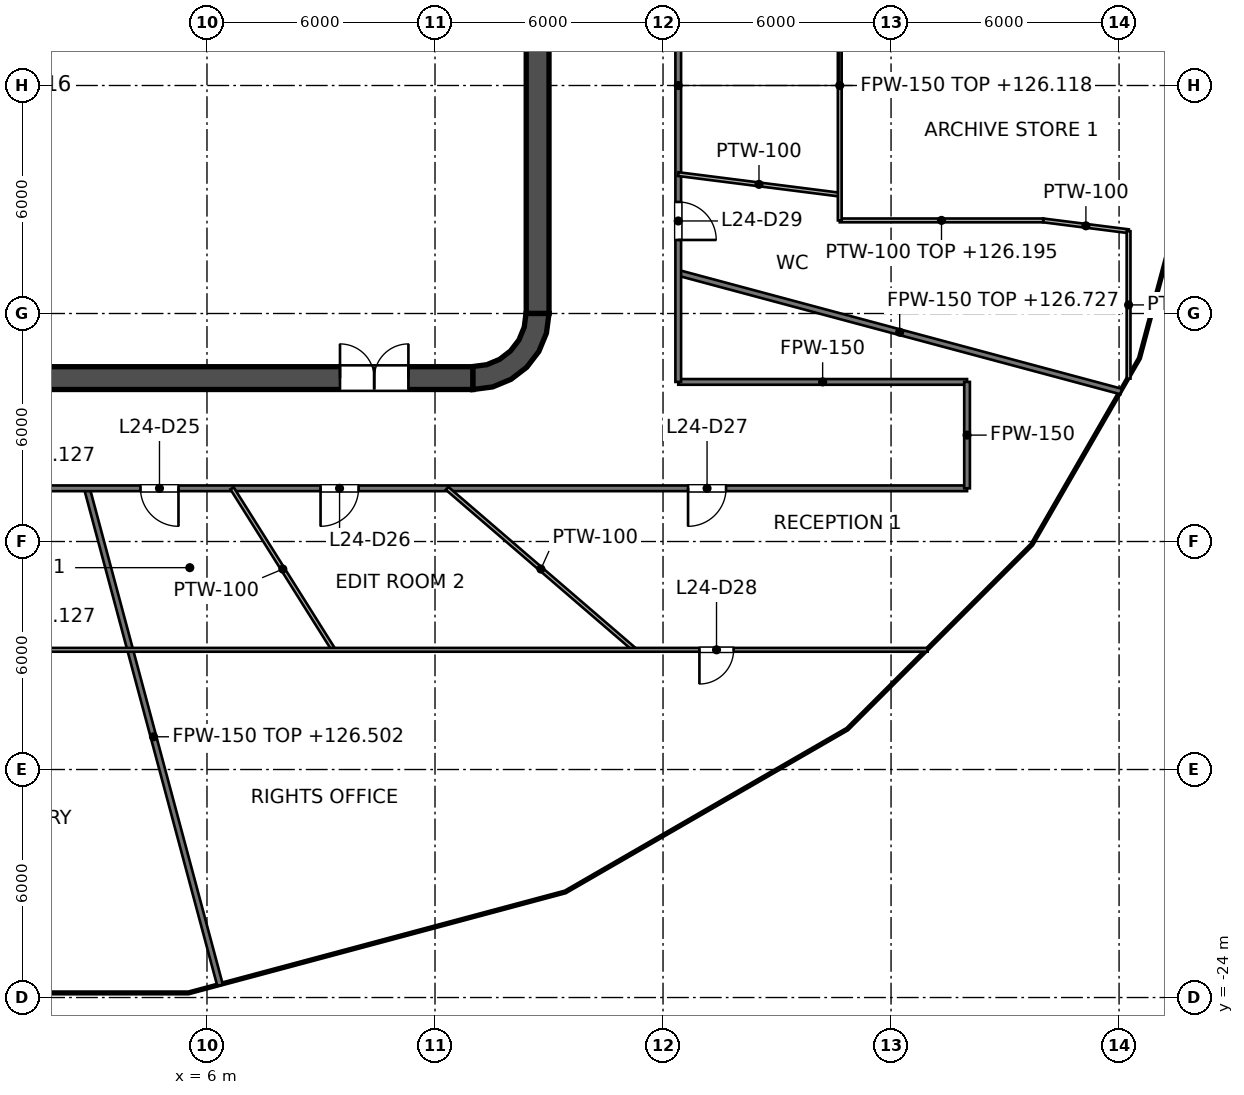
"""IFC4 building model, lengths in metres.
Left out: names, types, materials, properties, quantities, classifications, styles, units other than length and angle.
Written with IfcOpenShell. Run it as: python <this file> out.ifc"""

import sys

from ifc_helpers import new_model, si_unit, direction, frame, frame_2d, origin, place, context, subcontext, project, spatial, polyline, rectangle, outline, extrude, element, fill, save


model = new_model("IFC4")
c1 = context("Model", 3, precision=1e-05, world=origin(), true_north=direction((0.0, 1.0)))
c2 = subcontext(c1, "Body", "Model", "MODEL_VIEW")
j1 = project(units=[si_unit("LENGTHUNIT", "METRE"), si_unit("PLANEANGLEUNIT", "RADIAN")], contexts=[c1])
p1 = place(None, origin())
s1 = spatial("IfcSite", under=j1, at=p1, CompositionType="ELEMENT")
p2 = place(p1, origin())
s2 = spatial("IfcBuilding", under=s1, at=p2, CompositionType="ELEMENT")
p3 = place(p2, frame((0.0, 0.0, 123.0)))
s3 = spatial("IfcBuildingStorey", under=s2, at=p3, CompositionType="ELEMENT", Elevation=123.0)
p4 = place(p3, frame((-13.0, -7.7, 0.0), z_axis=(0.0, 0.0, 1.0), x_axis=(1.0, 0.0, 0.0)))
e1 = element("IfcWall", 1, at=p4, inside=s3, PredefinedType="SHEAR", context=c2, shape_type="SweptSolid", body=[
    extrude(rectangle(XDim=26.0, YDim=0.6, at=frame_2d((13.0, 0.0))), origin(), (0.0, 0.0, 1.0), 4.2),
])
p5 = place(p4, frame((1.7, 0.0, 0.0)))
e2 = element("IfcOpeningElement", 2, at=p5, cuts=e1, PredefinedType="OPENING", context=c2, shape_type="SweptSolid", body=[
    extrude(rectangle(XDim=1.8, YDim=2.1, at=frame_2d((0.9, 1.05))), frame((0.0, 0.3, 0.0), z_axis=(0.0, -1.0, 0.0), x_axis=(1.0, 0.0, 0.0)), (0.0, 0.0, 1.0), 0.6),
])
p6 = place(p4, frame((22.5, 0.0, 0.0)))
e3 = element("IfcOpeningElement", 3, at=p6, cuts=e1, PredefinedType="OPENING", context=c2, shape_type="SweptSolid", body=[
    extrude(rectangle(XDim=1.8, YDim=2.1, at=frame_2d((0.9, 1.05))), frame((0.0, 0.3, 0.0), z_axis=(0.0, -1.0, 0.0), x_axis=(1.0, 0.0, 0.0)), (0.0, 0.0, 1.0), 0.6),
])
p7 = place(p3, frame((14.7, -6.0, 0.0), z_axis=(0.0, 0.0, 1.0), x_axis=(0.0, 1.0, 0.0)))
e4 = element("IfcWall", 4, at=p7, inside=s3, PredefinedType="SHEAR", context=c2, shape_type="SweptSolid", body=[
    extrude(rectangle(XDim=12.0, YDim=0.6, at=frame_2d((6.0, 0.0))), origin(), (0.0, 0.0, 1.0), 4.2),
])
p8 = place(p3, origin())
e5 = element("IfcWall", 5, at=p8, inside=s3, PredefinedType="SHEAR", context=c2, shape_type="SweptSolid", body=[
    extrude(outline(polyline([(15.0, -6.0), (14.395, -6.0), (14.347, -6.361), (14.208, -6.698), (13.986, -6.986), (13.698, -7.208), (13.361, -7.347), (13.0, -7.395), (13.0, -8.0), (13.518, -7.932), (14.0, -7.732), (14.414, -7.414), (14.732, -7.0), (14.932, -6.518), (15.0, -6.0)])), origin(), (0.0, 0.0, 1.0), 4.2),
])
p9 = place(p3, frame((9.0, -6.6, 0.0), z_axis=(0.0, 0.0, 1.0), x_axis=(0.0, 1.0, 0.0)))
e6 = element("IfcWall", 6, at=p9, inside=s3, PredefinedType="SOLIDWALL", context=c2, shape_type="SweptSolid", body=[
    extrude(rectangle(XDim=2.5, YDim=0.25, at=frame_2d((1.25, 0.0))), origin(), (0.0, 0.0, 1.0), 4.05),
])
p10 = place(p9, frame((0.65, 0.0, 0.0)))
e7 = element("IfcOpeningElement", 7, at=p10, cuts=e6, PredefinedType="OPENING", context=c2, shape_type="SweptSolid", body=[
    extrude(rectangle(XDim=1.2, YDim=2.1, at=frame_2d((0.6, 1.05))), frame((0.0, 0.125, 0.0), z_axis=(0.0, -1.0, 0.0), x_axis=(1.0, 0.0, 0.0)), (0.0, 0.0, 1.0), 0.25),
])
p11 = place(p3, frame((3.15, -6.6, 0.0), z_axis=(0.0, 0.0, 1.0), x_axis=(0.0, 1.0, 0.0)))
e8 = element("IfcWall", 8, at=p11, inside=s3, PredefinedType="SOLIDWALL", context=c2, shape_type="SweptSolid", body=[
    extrude(rectangle(XDim=2.5, YDim=0.25, at=frame_2d((1.25, 0.0))), origin(), (0.0, 0.0, 1.0), 4.05),
])
p12 = place(p3, frame((-9.125, -7.0, 0.0), z_axis=(0.0, 0.0, 1.0), x_axis=(1.0, 0.0, 0.0)))
e9 = element("IfcWall", 9, at=p12, inside=s3, PredefinedType="SOLIDWALL", context=c2, shape_type="SweptSolid", body=[
    extrude(rectangle(XDim=18.25, YDim=0.8, at=frame_2d((9.125, 0.0))), origin(), (0.0, 0.0, 1.0), 4.05),
])
p13 = place(p3, frame((-9.125, -1.525, 0.0), z_axis=(0.0, 0.0, 1.0), x_axis=(1.0, 0.0, 0.0)))
e10 = element("IfcWall", 10, at=p13, inside=s3, PredefinedType="SOLIDWALL", context=c2, shape_type="SweptSolid", body=[
    extrude(rectangle(XDim=18.25, YDim=0.25, at=frame_2d((9.125, 0.0))), origin(), (0.0, 0.0, 1.0), 4.05),
])
p14 = place(p13, frame((7.15, 0.0, 0.0)))
e11 = element("IfcOpeningElement", 11, at=p14, cuts=e10, PredefinedType="OPENING", context=c2, shape_type="SweptSolid", body=[
    extrude(rectangle(XDim=1.2, YDim=2.1, at=frame_2d((0.6, 1.05))), frame((0.0, 0.125, 0.0), z_axis=(0.0, -1.0, 0.0), x_axis=(1.0, 0.0, 0.0)), (0.0, 0.0, 1.0), 0.25),
])
p15 = place(p13, frame((10.2, 0.0, 0.0)))
e12 = element("IfcOpeningElement", 12, at=p15, cuts=e10, PredefinedType="OPENING", context=c2, shape_type="SweptSolid", body=[
    extrude(rectangle(XDim=1.2, YDim=2.1, at=frame_2d((0.6, 1.05))), frame((0.0, 0.125, 0.0), z_axis=(0.0, -1.0, 0.0), x_axis=(1.0, 0.0, 0.0)), (0.0, 0.0, 1.0), 0.25),
])
p16 = place(p13, frame((16.075, 0.0, 0.0)))
e13 = element("IfcOpeningElement", 13, at=p16, cuts=e10, PredefinedType="OPENING", context=c2, shape_type="SweptSolid", body=[
    extrude(rectangle(XDim=1.0, YDim=2.1, at=frame_2d((0.5, 1.05))), frame((0.0, 0.125, 0.0), z_axis=(0.0, -1.0, 0.0), x_axis=(1.0, 0.0, 0.0)), (0.0, 0.0, 1.0), 0.25),
])
p17 = place(p3, frame((-9.125, -3.975, 0.0), z_axis=(0.0, 0.0, 1.0), x_axis=(1.0, 0.0, 0.0)))
e14 = element("IfcWall", 14, at=p17, inside=s3, PredefinedType="SOLIDWALL", context=c2, shape_type="SweptSolid", body=[
    extrude(rectangle(XDim=12.4, YDim=0.25, at=frame_2d((6.2, 0.0))), origin(), (0.0, 0.0, 1.0), 4.05),
])
p18 = place(p17, frame((1.05, 0.0, 0.0)))
e15 = element("IfcOpeningElement", 15, at=p18, cuts=e14, PredefinedType="OPENING", context=c2, shape_type="SweptSolid", body=[
    extrude(rectangle(XDim=1.2, YDim=2.1, at=frame_2d((0.6, 1.05))), frame((0.0, 0.125, 0.0), z_axis=(0.0, -1.0, 0.0), x_axis=(1.0, 0.0, 0.0)), (0.0, 0.0, 1.0), 0.25),
])
p19 = place(p17, frame((4.1, 0.0, 0.0)))
e16 = element("IfcOpeningElement", 16, at=p19, cuts=e14, PredefinedType="OPENING", context=c2, shape_type="SweptSolid", body=[
    extrude(rectangle(XDim=1.2, YDim=2.1, at=frame_2d((0.6, 1.05))), frame((0.0, 0.125, 0.0), z_axis=(0.0, -1.0, 0.0), x_axis=(1.0, 0.0, 0.0)), (0.0, 0.0, 1.0), 0.25),
])
p20 = place(p3, frame((3.275, -3.975, 0.0), z_axis=(0.0, 0.0, 1.0), x_axis=(1.0, 0.0, 0.0)))
e17 = element("IfcWall", 17, at=p20, inside=s3, PredefinedType="SOLIDWALL", context=c2, shape_type="SweptSolid", body=[
    extrude(rectangle(XDim=5.85, YDim=0.25, at=frame_2d((2.925, 0.0))), origin(), (0.0, 0.0, 1.0), 4.05),
])
for number, where, z_axis, x_axis in (
    (18, (3.2, -3.85, 0.0), (0.0, 0.0, 1.0), (0.0, 1.0, 0.0)),
    (19, (5.9, -3.85, 0.0), (0.0, 0.0, 1.0), (0.0, 1.0, 0.0)),
    (20, (9.0, -3.85, 0.0), (0.0, 0.0, 1.0), (0.0, 1.0, 0.0)),
):
    element("IfcWall", number, at=place(p3, frame(where, z_axis=z_axis, x_axis=x_axis)), inside=s3, PredefinedType="SOLIDWALL", context=c2, shape_type="SweptSolid", body=[
        extrude(rectangle(XDim=2.2, YDim=0.25, at=frame_2d((1.1, 0.0))), origin(), (0.0, 0.0, 1.0), 4.05),
    ])
p21 = place(p3, frame((11.8, -7.4, 0.0), z_axis=(0.0, 0.0, 1.0), x_axis=(0.0, 1.0, 0.0)))
e21 = element("IfcWall", 21, at=p21, inside=s3, PredefinedType="SOLIDWALL", context=c2, shape_type="SweptSolid", body=[
    extrude(rectangle(XDim=14.8, YDim=0.4, at=frame_2d((7.4, 0.0))), origin(), (0.0, 0.0, 1.0), 4.05),
])
p22 = place(p21, frame((11.2, 0.0, 0.0)))
e22 = element("IfcOpeningElement", 22, at=p22, cuts=e21, PredefinedType="OPENING", context=c2, shape_type="SweptSolid", body=[
    extrude(rectangle(XDim=1.1, YDim=2.1, at=frame_2d((0.55, 1.05))), frame((0.0, 0.2, 0.0), z_axis=(0.0, -1.0, 0.0), x_axis=(1.0, 0.0, 0.0)), (0.0, 0.0, 1.0), 0.4),
])
p23 = place(p21, frame((8.3, 0.0, 0.0)))
e23 = element("IfcOpeningElement", 23, at=p23, cuts=e21, PredefinedType="OPENING", context=c2, shape_type="SweptSolid", body=[
    extrude(rectangle(XDim=1.1, YDim=2.1, at=frame_2d((0.55, 1.05))), frame((0.0, 0.2, 0.0), z_axis=(0.0, -1.0, 0.0), x_axis=(1.0, 0.0, 0.0)), (0.0, 0.0, 1.0), 0.4),
])
p24 = place(p21, frame((5.4, 0.0, 0.0)))
e24 = element("IfcOpeningElement", 24, at=p24, cuts=e21, PredefinedType="OPENING", context=c2, shape_type="SweptSolid", body=[
    extrude(rectangle(XDim=1.1, YDim=2.1, at=frame_2d((0.55, 1.05))), frame((0.0, 0.2, 0.0), z_axis=(0.0, -1.0, 0.0), x_axis=(1.0, 0.0, 0.0)), (0.0, 0.0, 1.0), 0.4),
])
p25 = place(p21, frame((13.552, 0.0, 0.0)))
e25 = element("IfcOpeningElement", 25, at=p25, cuts=e21, PredefinedType="OPENING", context=c2, shape_type="SweptSolid", body=[
    extrude(rectangle(XDim=0.9, YDim=2.1, at=frame_2d((0.45, 1.05))), frame((0.0, 0.2, 0.0), z_axis=(0.0, -1.0, 0.0), x_axis=(1.0, 0.0, 0.0)), (0.0, 0.0, 1.0), 0.4),
])
p26 = place(p21, frame((0.347, 0.0, 0.0)))
e26 = element("IfcOpeningElement", 26, at=p26, cuts=e21, PredefinedType="OPENING", context=c2, shape_type="SweptSolid", body=[
    extrude(rectangle(XDim=0.9, YDim=2.1, at=frame_2d((0.45, 1.05))), frame((0.0, 0.2, 0.0), z_axis=(0.0, -1.0, 0.0), x_axis=(1.0, 0.0, 0.0)), (0.0, 0.0, 1.0), 0.4),
])
e27 = element("IfcWall", 27, at=p8, inside=s3, PredefinedType="SOLIDWALL", context=c2, shape_type="SweptSolid", body=[
    extrude(outline(polyline([(12.0, -5.675), (12.0, -5.925), (14.15, -5.925), (14.4, -5.925), (14.4, -5.675), (14.4, -3.025), (14.4, -2.775), (14.4, -0.125), (14.4, 0.125), (14.4, 2.775), (14.4, 3.025), (14.4, 5.675), (14.4, 5.925), (14.15, 5.925), (12.0, 5.925), (12.0, 5.675), (14.15, 5.675), (14.15, 3.025), (12.0, 3.025), (12.0, 2.775), (14.15, 2.775), (14.15, 0.125), (12.0, 0.125), (12.0, -0.125), (14.15, -0.125), (14.15, -2.775), (12.0, -2.775), (12.0, -3.025), (14.15, -3.025), (14.15, -5.675), (12.0, -5.675)])), origin(), (0.0, 0.0, 1.0), 4.05),
])
p27 = place(p3, frame((2.84, -10.6, 0.0), z_axis=(0.0, 0.0, 1.0), x_axis=(0.258833134742, -0.965922050872, 0.0)))
e28 = element("IfcWall", 28, at=p27, inside=s3, PredefinedType="PARTITIONING", context=c2, shape_type="SweptSolid", body=[
    extrude(rectangle(XDim=13.538, YDim=0.15, at=frame_2d((6.769, 0.0))), origin(), (0.0, 0.0, 1.0), 3.502),
])
p28 = place(p3, frame((18.4, -4.93, 0.0), z_axis=(0.0, 0.0, 1.0), x_axis=(0.96591851449, -0.258846331567, 0.0)))
e29 = element("IfcWall", 29, at=p28, inside=s3, PredefinedType="PARTITIONING", context=c2, shape_type="SweptSolid", body=[
    extrude(rectangle(XDim=12.065, YDim=0.15, at=frame_2d((6.033, 0.0))), origin(), (0.0, 0.0, 1.0), 3.727),
])
p29 = place(p3, frame((-26.0, -10.6, 0.0), z_axis=(0.0, 0.0, 1.0), x_axis=(1.0, 0.0, 0.0)))
e30 = element("IfcWall", 30, at=p29, inside=s3, PredefinedType="PARTITIONING", context=c2, shape_type="SweptSolid", body=[
    extrude(rectangle(XDim=52.0, YDim=0.15, at=frame_2d((26.0, 0.0))), origin(), (0.0, 0.0, 1.0), 3.127),
])
p30 = place(p29, frame((17.62, 0.0, 0.0)))
e31 = element("IfcOpeningElement", 31, at=p30, cuts=e30, PredefinedType="OPENING", context=c2, shape_type="SweptSolid", body=[
    extrude(rectangle(XDim=1.2, YDim=2.1, at=frame_2d((0.6, 1.05))), frame((0.0, 0.075, 0.0), z_axis=(0.0, -1.0, 0.0), x_axis=(1.0, 0.0, 0.0)), (0.0, 0.0, 1.0), 0.15),
])
p31 = place(p29, frame((30.25, 0.0, 0.0)))
e32 = element("IfcOpeningElement", 32, at=p31, cuts=e30, PredefinedType="OPENING", context=c2, shape_type="SweptSolid", body=[
    extrude(rectangle(XDim=1.0, YDim=2.1, at=frame_2d((0.5, 1.05))), frame((0.0, 0.075, 0.0), z_axis=(0.0, -1.0, 0.0), x_axis=(1.0, 0.0, 0.0)), (0.0, 0.0, 1.0), 0.15),
])
p32 = place(p29, frame((34.989, 0.0, 0.0)))
e33 = element("IfcOpeningElement", 33, at=p32, cuts=e30, PredefinedType="OPENING", context=c2, shape_type="SweptSolid", body=[
    extrude(rectangle(XDim=1.0, YDim=2.1, at=frame_2d((0.5, 1.05))), frame((0.0, 0.075, 0.0), z_axis=(0.0, -1.0, 0.0), x_axis=(1.0, 0.0, 0.0)), (0.0, 0.0, 1.0), 0.15),
])
p33 = place(p29, frame((44.658, 0.0, 0.0)))
e34 = element("IfcOpeningElement", 34, at=p33, cuts=e30, PredefinedType="OPENING", context=c2, shape_type="SweptSolid", body=[
    extrude(rectangle(XDim=1.0, YDim=2.1, at=frame_2d((0.5, 1.05))), frame((0.0, 0.075, 0.0), z_axis=(0.0, -1.0, 0.0), x_axis=(1.0, 0.0, 0.0)), (0.0, 0.0, 1.0), 0.15),
])
p34 = place(p3, frame((18.4, -7.8, 0.0), z_axis=(0.0, 0.0, 1.0), x_axis=(1.0, 0.0, 0.0)))
e35 = element("IfcWall", 35, at=p34, inside=s3, PredefinedType="PARTITIONING", context=c2, shape_type="SweptSolid", body=[
    extrude(rectangle(XDim=7.6, YDim=0.15, at=frame_2d((3.8, 0.0))), origin(), (0.0, 0.0, 1.0), 3.276),
])
p35 = place(p3, frame((26.0, -10.6, 0.0), z_axis=(0.0, 0.0, 1.0), x_axis=(0.0, 1.0, 0.0)))
e36 = element("IfcWall", 36, at=p35, inside=s3, PredefinedType="PARTITIONING", context=c2, shape_type="SweptSolid", body=[
    extrude(rectangle(XDim=2.8, YDim=0.15, at=frame_2d((1.4, 0.0))), origin(), (0.0, 0.0, 1.0), 3.276),
])
p36 = place(p3, frame((18.4, -7.8, 0.0), z_axis=(0.0, 0.0, 1.0), x_axis=(0.0, 1.0, 0.0)))
e37 = element("IfcWall", 37, at=p36, inside=s3, PredefinedType="PARTITIONING", context=c2, shape_type="SweptSolid", body=[
    extrude(rectangle(XDim=15.6, YDim=0.15, at=frame_2d((7.8, 0.0))), origin(), (0.0, 0.0, 1.0), 3.118),
])
p37 = place(p36, frame((3.735, 0.0, 0.0)))
e38 = element("IfcOpeningElement", 38, at=p37, cuts=e37, PredefinedType="OPENING", context=c2, shape_type="SweptSolid", body=[
    extrude(rectangle(XDim=1.0, YDim=2.1, at=frame_2d((0.5, 1.05))), frame((0.0, 0.075, 0.0), z_axis=(0.0, -1.0, 0.0), x_axis=(1.0, 0.0, 0.0)), (0.0, 0.0, 1.0), 0.15),
])
p38 = place(p3, frame((6.66, -10.6, 0.0), z_axis=(0.0, 0.0, 1.0), x_axis=(0.532130705972, -0.846662218221, 0.0)))
e39 = element("IfcWall", 39, at=p38, inside=s3, PredefinedType="PARTITIONING", context=c2, shape_type="SweptSolid", body=[
    extrude(rectangle(XDim=5.02, YDim=0.1, at=frame_2d((2.51, 0.0))), origin(), (0.0, 0.0, 1.0), 4.05),
])
p39 = place(p3, frame((12.317, -10.6, 0.0), z_axis=(0.0, 0.0, 1.0), x_axis=(0.758012166178, -0.652240412675, 0.0)))
e40 = element("IfcWall", 40, at=p39, inside=s3, PredefinedType="PARTITIONING", context=c2, shape_type="SweptSolid", body=[
    extrude(rectangle(XDim=6.516, YDim=0.1, at=frame_2d((3.258, 0.0))), origin(), (0.0, 0.0, 1.0), 4.05),
])
p40 = place(p3, frame((18.4, -2.332, 0.0), z_axis=(0.0, 0.0, 1.0), x_axis=(0.992044690644, -0.125886185756, 0.0)))
e41 = element("IfcWall", 41, at=p40, inside=s3, PredefinedType="PARTITIONING", context=c2, shape_type="SweptSolid", body=[
    extrude(rectangle(XDim=4.284, YDim=0.1, at=frame_2d((2.142, 0.0))), origin(), (0.0, 0.0, 1.0), 4.05),
])
p41 = place(p3, frame((28.005, -3.55, 0.0), z_axis=(0.0, 0.0, 1.0), x_axis=(0.992043783592, -0.125893333564, 0.0)))
e42 = element("IfcWall", 42, at=p41, inside=s3, PredefinedType="PARTITIONING", context=c2, shape_type="SweptSolid", body=[
    extrude(rectangle(XDim=2.263, YDim=0.1, at=frame_2d((1.132, 0.0))), origin(), (0.0, 0.0, 1.0), 4.05),
])
p42 = place(p3, frame((-24.963, -14.85, 0.0), z_axis=(0.0, 0.0, 1.0), x_axis=(1.0, 0.0, 0.0)))
e43 = element("IfcWall", 43, at=p42, inside=s3, PredefinedType="PARTITIONING", context=c2, shape_type="SweptSolid", body=[
    extrude(rectangle(XDim=49.926, YDim=0.1, at=frame_2d((24.963, 0.0))), origin(), (0.0, 0.0, 1.0), 3.127),
])
p43 = place(p42, frame((13.521, 0.0, 0.0)))
e44 = element("IfcOpeningElement", 44, at=p43, cuts=e43, PredefinedType="OPENING", context=c2, shape_type="SweptSolid", body=[
    extrude(rectangle(XDim=1.8, YDim=2.1, at=frame_2d((0.9, 1.05))), frame((0.0, 0.05, 0.0), z_axis=(0.0, -1.0, 0.0), x_axis=(1.0, 0.0, 0.0)), (0.0, 0.0, 1.0), 0.1),
])
p44 = place(p42, frame((43.92, 0.0, 0.0)))
e45 = element("IfcOpeningElement", 45, at=p44, cuts=e43, PredefinedType="OPENING", context=c2, shape_type="SweptSolid", body=[
    extrude(rectangle(XDim=0.9, YDim=2.1, at=frame_2d((0.45, 1.05))), frame((0.0, 0.05, 0.0), z_axis=(0.0, -1.0, 0.0), x_axis=(1.0, 0.0, 0.0)), (0.0, 0.0, 1.0), 0.1),
])
p45 = place(p3, frame((22.65, -3.55, 0.0), z_axis=(0.0, 0.0, 1.0), x_axis=(1.0, 0.0, 0.0)))
e46 = element("IfcWall", 46, at=p45, inside=s3, PredefinedType="PARTITIONING", context=c2, shape_type="SweptSolid", body=[
    extrude(rectangle(XDim=5.355, YDim=0.1, at=frame_2d((2.677, 0.0))), origin(), (0.0, 0.0, 1.0), 3.195),
])
p46 = place(p3, frame((30.25, -7.713, 0.0), z_axis=(0.0, 0.0, 1.0), x_axis=(0.0, 1.0, 0.0)))
e47 = element("IfcWall", 47, at=p46, inside=s3, PredefinedType="PARTITIONING", context=c2, shape_type="SweptSolid", body=[
    extrude(rectangle(XDim=3.878, YDim=0.1, at=frame_2d((1.939, 0.0))), origin(), (0.0, 0.0, 1.0), 3.127),
])
p47 = place(p3, frame((22.65, -3.55, 0.0), z_axis=(0.0, 0.0, 1.0), x_axis=(0.0, 1.0, 0.0)))
e48 = element("IfcWall", 48, at=p47, inside=s3, PredefinedType="PARTITIONING", context=c2, shape_type="SweptSolid", body=[
    extrude(rectangle(XDim=7.1, YDim=0.1, at=frame_2d((3.55, 0.0))), origin(), (0.0, 0.0, 1.0), 3.118),
])
p48 = place(p24, origin())
e49 = element("IfcDoor", 49, at=p48, inside=s3, OperationType="DOUBLE_DOOR_SLIDING", PredefinedType="DOOR", context=c2, shape_type="SweptSolid", body=[
    extrude(rectangle(XDim=1.1, YDim=2.1, at=frame_2d((0.55, 1.05))), frame((0.0, 0.025, 0.0), z_axis=(0.0, -1.0, 0.0), x_axis=(1.0, 0.0, 0.0)), (0.0, 0.0, 1.0), 0.05),
])
fill(e24, e49)
p49 = place(p15, origin())
e50 = element("IfcDoor", 50, at=p49, inside=s3, OperationType="DOUBLE_DOOR_SLIDING", PredefinedType="DOOR", context=c2, shape_type="SweptSolid", body=[
    extrude(rectangle(XDim=1.2, YDim=2.1, at=frame_2d((0.6, 1.05))), frame((0.0, 0.025, 0.0), z_axis=(0.0, -1.0, 0.0), x_axis=(1.0, 0.0, 0.0)), (0.0, 0.0, 1.0), 0.05),
])
fill(e12, e50)
p50 = place(p10, origin())
e51 = element("IfcDoor", 51, at=p50, inside=s3, OperationType="SINGLE_SWING_LEFT", PredefinedType="DOOR", context=c2, shape_type="SweptSolid", body=[
    extrude(rectangle(XDim=1.2, YDim=2.1, at=frame_2d((0.6, 1.05))), frame((0.0, 0.025, 0.0), z_axis=(0.0, -1.0, 0.0), x_axis=(1.0, 0.0, 0.0)), (0.0, 0.0, 1.0), 0.05),
])
fill(e7, e51)
p51 = place(p16, origin())
e52 = element("IfcDoor", 52, at=p51, inside=s3, OperationType="SINGLE_SWING_RIGHT", PredefinedType="DOOR", context=c2, shape_type="SweptSolid", body=[
    extrude(rectangle(XDim=1.0, YDim=2.1, at=frame_2d((0.5, 1.05))), frame((0.0, 0.025, 0.0), z_axis=(0.0, -1.0, 0.0), x_axis=(1.0, 0.0, 0.0)), (0.0, 0.0, 1.0), 0.05),
])
fill(e13, e52)
p52 = place(p26, origin())
e53 = element("IfcDoor", 53, at=p52, inside=s3, OperationType="SINGLE_SWING_RIGHT", PredefinedType="DOOR", context=c2, shape_type="SweptSolid", body=[
    extrude(rectangle(XDim=0.9, YDim=2.1, at=frame_2d((0.45, 1.05))), frame((0.0, 0.025, 0.0), z_axis=(0.0, -1.0, 0.0), x_axis=(1.0, 0.0, 0.0)), (0.0, 0.0, 1.0), 0.05),
])
fill(e26, e53)
p53 = place(p6, origin())
e54 = element("IfcDoor", 54, at=p53, inside=s3, OperationType="DOUBLE_DOOR_SINGLE_SWING", PredefinedType="DOOR", context=c2, shape_type="SweptSolid", body=[
    extrude(rectangle(XDim=1.8, YDim=2.1, at=frame_2d((0.9, 1.05))), frame((0.0, 0.025, 0.0), z_axis=(0.0, -1.0, 0.0), x_axis=(1.0, 0.0, 0.0)), (0.0, 0.0, 1.0), 0.05),
])
fill(e3, e54)
p54 = place(p31, origin())
e55 = element("IfcDoor", 55, at=p54, inside=s3, OperationType="SINGLE_SWING_RIGHT", PredefinedType="DOOR", context=c2, shape_type="SweptSolid", body=[
    extrude(rectangle(XDim=1.0, YDim=2.1, at=frame_2d((0.5, 1.05))), frame((0.0, 0.025, 0.0), z_axis=(0.0, -1.0, 0.0), x_axis=(1.0, 0.0, 0.0)), (0.0, 0.0, 1.0), 0.05),
])
fill(e32, e55)
p55 = place(p32, origin())
e56 = element("IfcDoor", 56, at=p55, inside=s3, OperationType="SINGLE_SWING_LEFT", PredefinedType="DOOR", context=c2, shape_type="SweptSolid", body=[
    extrude(rectangle(XDim=1.0, YDim=2.1, at=frame_2d((0.5, 1.05))), frame((0.0, 0.025, 0.0), z_axis=(0.0, -1.0, 0.0), x_axis=(1.0, 0.0, 0.0)), (0.0, 0.0, 1.0), 0.05),
])
fill(e33, e56)
p56 = place(p33, origin())
e57 = element("IfcDoor", 57, at=p56, inside=s3, OperationType="SINGLE_SWING_LEFT", PredefinedType="DOOR", context=c2, shape_type="SweptSolid", body=[
    extrude(rectangle(XDim=1.0, YDim=2.1, at=frame_2d((0.5, 1.05))), frame((0.0, 0.025, 0.0), z_axis=(0.0, -1.0, 0.0), x_axis=(1.0, 0.0, 0.0)), (0.0, 0.0, 1.0), 0.05),
])
fill(e34, e57)
p57 = place(p44, origin())
e58 = element("IfcDoor", 58, at=p57, inside=s3, OperationType="SINGLE_SWING_LEFT", PredefinedType="DOOR", context=c2, shape_type="SweptSolid", body=[
    extrude(rectangle(XDim=0.9, YDim=2.1, at=frame_2d((0.45, 1.05))), frame((0.0, 0.025, 0.0), z_axis=(0.0, -1.0, 0.0), x_axis=(1.0, 0.0, 0.0)), (0.0, 0.0, 1.0), 0.05),
])
fill(e45, e58)
p58 = place(p37, origin())
e59 = element("IfcDoor", 59, at=p58, inside=s3, OperationType="SINGLE_SWING_LEFT", PredefinedType="DOOR", context=c2, shape_type="SweptSolid", body=[
    extrude(rectangle(XDim=1.0, YDim=2.1, at=frame_2d((0.5, 1.05))), frame((0.0, 0.025, 0.0), z_axis=(0.0, -1.0, 0.0), x_axis=(1.0, 0.0, 0.0)), (0.0, 0.0, 1.0), 0.05),
])
fill(e38, e59)
save(model, sys.argv[1])
